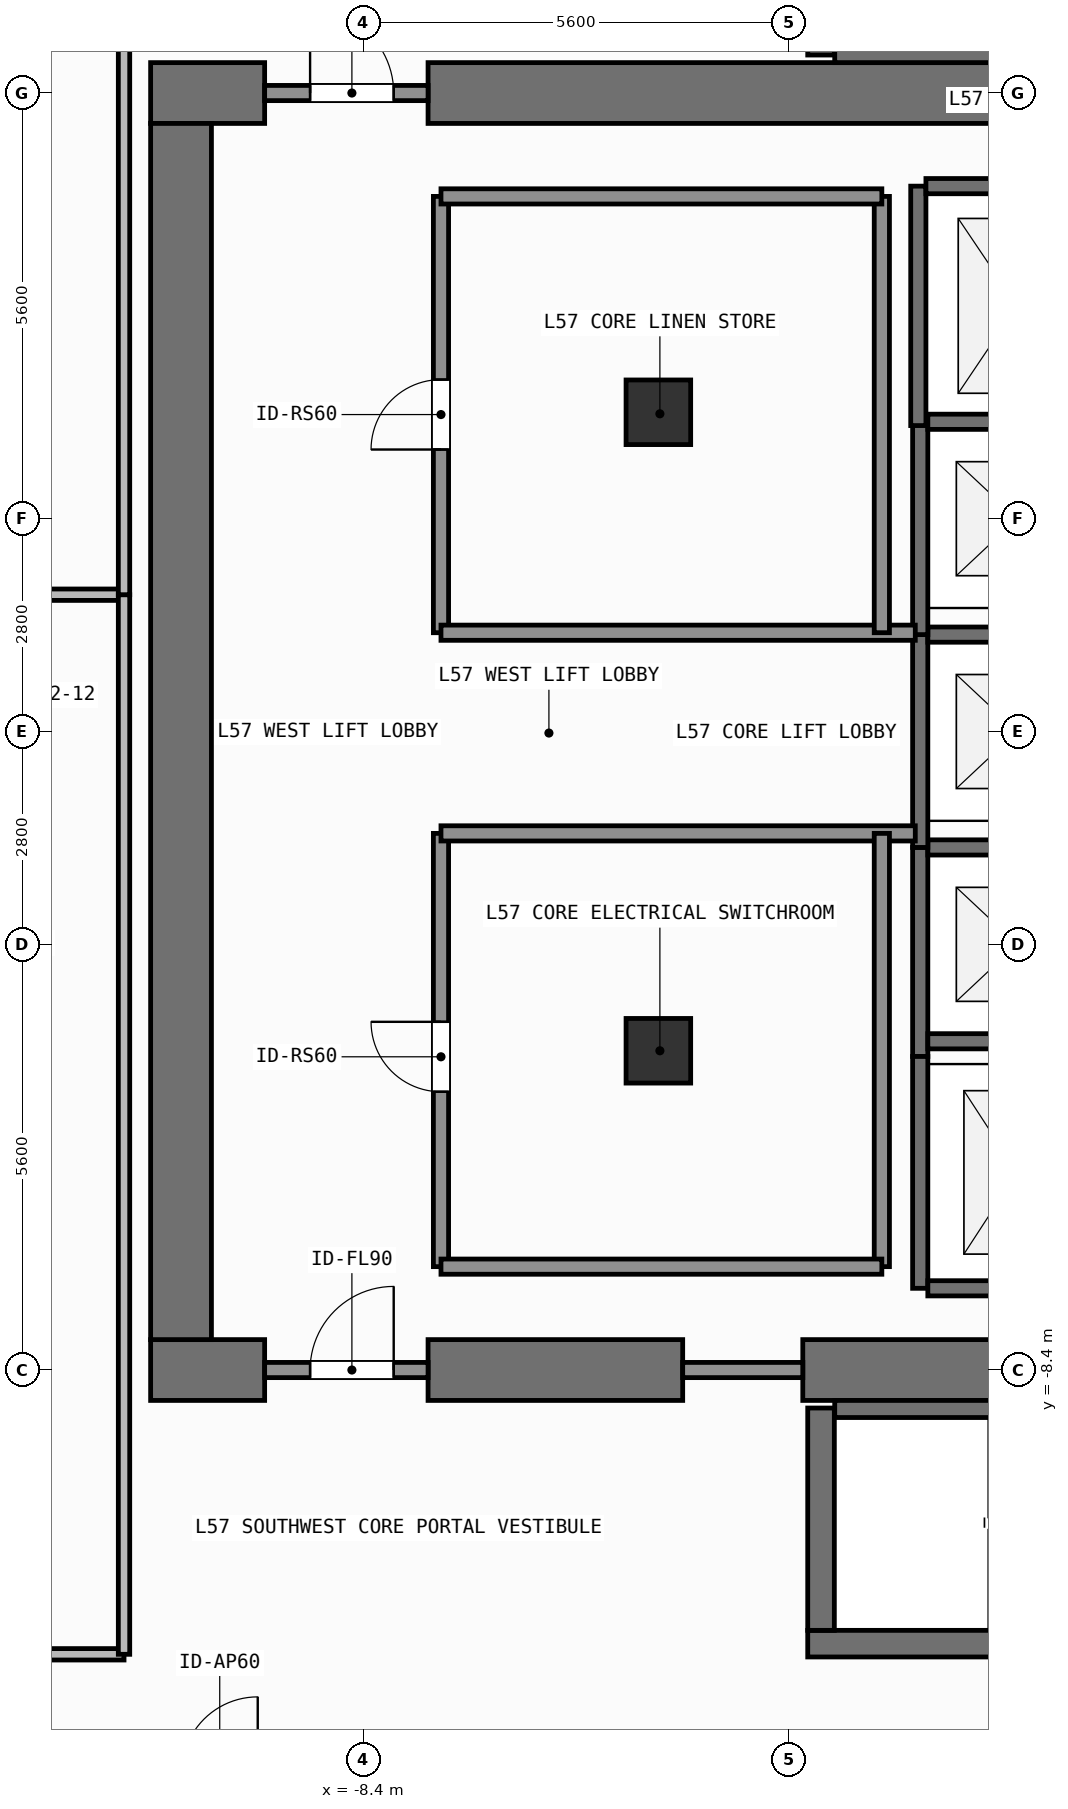
"""IFC4 building model, lengths in metres.
Left out: names, types, materials, properties, quantities, classifications, styles, units other than length and angle.
Written with IfcOpenShell. Run it as: python <this file> out.ifc"""

import sys

from ifc_helpers import new_model, si_unit, direction, frame, frame_2d, origin, origin_2d, place, context, subcontext, project, spatial, rectangle, extrude, element, fill, save


model = new_model("IFC4")
c1 = context("Model", 3, precision=1e-05, world=origin(), true_north=direction((0.0, 1.0)))
c2 = subcontext(c1, "Body", "Model", "MODEL_VIEW")
j1 = project(units=[si_unit("LENGTHUNIT", "METRE"), si_unit("PLANEANGLEUNIT", "RADIAN")], contexts=[c1])
p1 = place(None, origin())
s1 = spatial("IfcSite", under=j1, at=p1, CompositionType="ELEMENT")
p2 = place(p1, origin())
s2 = spatial("IfcBuilding", under=s1, at=p2, CompositionType="ELEMENT")
p3 = place(p2, frame((0.0, 0.0, 231.3)))
s3 = spatial("IfcBuildingStorey", under=s2, at=p3, CompositionType="ELEMENT", Elevation=231.3)
p4 = place(p3, frame((-11.2, -8.4, 0.0), z_axis=(0.0, 0.0, 1.0), x_axis=(1.0, 0.0, 0.0)))
e1 = element("IfcWall", 1, at=p4, inside=s3, PredefinedType="SHEAR", context=c2, shape_type="SweptSolid", body=[
    extrude(rectangle(XDim=1.5, YDim=0.8, at=frame_2d((0.75, 0.0))), origin(), (0.0, 0.0, 1.0), 3.9),
])
p5 = place(p3, frame((-7.55, -8.4, 0.0), z_axis=(0.0, 0.0, 1.0), x_axis=(1.0, 0.0, 0.0)))
e2 = element("IfcWall", 2, at=p5, inside=s3, PredefinedType="SHEAR", context=c2, shape_type="SweptSolid", body=[
    extrude(rectangle(XDim=3.35, YDim=0.8, at=frame_2d((1.675, 0.0))), origin(), (0.0, 0.0, 1.0), 3.9),
])
p6 = place(p3, frame((-2.62, -8.4, 0.0), z_axis=(0.0, 0.0, 1.0), x_axis=(1.0, 0.0, 0.0)))
e3 = element("IfcWall", 3, at=p6, inside=s3, PredefinedType="SHEAR", context=c2, shape_type="SweptSolid", body=[
    extrude(rectangle(XDim=7.27, YDim=0.8, at=frame_2d((3.635, 0.0))), origin(), (0.0, 0.0, 1.0), 3.9),
])
p7 = place(p3, frame((-11.2, 8.4, 0.0), z_axis=(0.0, 0.0, 1.0), x_axis=(1.0, 0.0, 0.0)))
e4 = element("IfcWall", 4, at=p7, inside=s3, PredefinedType="SHEAR", context=c2, shape_type="SweptSolid", body=[
    extrude(rectangle(XDim=1.5, YDim=0.8, at=frame_2d((0.75, 0.0))), origin(), (0.0, 0.0, 1.0), 3.9),
])
p8 = place(p3, frame((-7.55, 8.4, 0.0), z_axis=(0.0, 0.0, 1.0), x_axis=(1.0, 0.0, 0.0)))
e5 = element("IfcWall", 5, at=p8, inside=s3, PredefinedType="SHEAR", context=c2, shape_type="SweptSolid", body=[
    extrude(rectangle(XDim=16.35, YDim=0.8, at=frame_2d((8.175, 0.0))), origin(), (0.0, 0.0, 1.0), 3.9),
])
p9 = place(p3, frame((-10.8, -8.0, 0.0), z_axis=(0.0, 0.0, 1.0), x_axis=(0.0, 1.0, 0.0)))
e6 = element("IfcWall", 6, at=p9, inside=s3, PredefinedType="SHEAR", context=c2, shape_type="SweptSolid", body=[
    extrude(rectangle(XDim=16.0, YDim=0.8, at=frame_2d((8.0, 0.0))), origin(), (0.0, 0.0, 1.0), 3.9),
])
p10 = place(p3, frame((-2.555, -12.0, 0.0), z_axis=(0.0, 0.0, 1.0), x_axis=(1.0, 0.0, 0.0)))
e7 = element("IfcWall", 7, at=p10, inside=s3, PredefinedType="SHEAR", context=c2, shape_type="SweptSolid", body=[
    extrude(rectangle(XDim=7.31, YDim=0.35, at=frame_2d((3.655, 0.0))), origin(), (0.0, 0.0, 1.0), 3.9),
])
p11 = place(p3, frame((-2.2, -8.913, 0.0), z_axis=(0.0, 0.0, 1.0), x_axis=(1.0, 0.0, 0.0)))
e8 = element("IfcWall", 8, at=p11, inside=s3, PredefinedType="SHEAR", context=c2, shape_type="SweptSolid", body=[
    extrude(rectangle(XDim=6.6, YDim=0.225, at=frame_2d((3.3, 0.0))), origin(), (0.0, 0.0, 1.0), 3.9),
])
p12 = place(p3, frame((-2.38, -11.825, 0.0), z_axis=(0.0, 0.0, 1.0), x_axis=(0.0, 1.0, 0.0)))
e9 = element("IfcWall", 9, at=p12, inside=s3, PredefinedType="SHEAR", context=c2, shape_type="SweptSolid", body=[
    extrude(rectangle(XDim=2.925, YDim=0.35, at=frame_2d((1.462, 0.0))), origin(), (0.0, 0.0, 1.0), 3.9),
])
p13 = place(p3, frame((-2.2, 8.913, 0.0), z_axis=(0.0, 0.0, 1.0), x_axis=(1.0, 0.0, 0.0)))
e10 = element("IfcWall", 10, at=p13, inside=s3, PredefinedType="SHEAR", context=c2, shape_type="SweptSolid", body=[
    extrude(rectangle(XDim=6.6, YDim=0.225, at=frame_2d((3.3, 0.0))), origin(), (0.0, 0.0, 1.0), 3.9),
])
p14 = place(p3, frame((-2.38, 8.9, 0.0), z_axis=(0.0, 0.0, 1.0), x_axis=(0.0, 1.0, 0.0)))
e11 = element("IfcWall", 11, at=p14, inside=s3, PredefinedType="SHEAR", context=c2, shape_type="SweptSolid", body=[
    extrude(rectangle(XDim=2.925, YDim=0.35, at=frame_2d((1.462, 0.0))), origin(), (0.0, 0.0, 1.0), 3.9),
])
for number, where, z_axis, x_axis in (
    (12, (-4.52, -4.2, 0.0), (0.0, 0.0, 1.0), (1.0, 0.0, 0.0)),
    (13, (-4.52, 4.2, 0.0), (0.0, 0.0, 1.0), (1.0, 0.0, 0.0)),
):
    element("IfcColumn", number, at=place(p3, frame(where, z_axis=z_axis, x_axis=x_axis)), inside=s3, PredefinedType="COLUMN", context=c2, shape_type="SweptSolid", body=[
        extrude(rectangle(XDim=0.85, YDim=0.85, at=origin_2d()), origin(), (0.0, 0.0, 1.0), 3.9),
    ])
p15 = place(p3, frame((-1.075, -4.275, 0.0), z_axis=(0.0, 0.0, 1.0), x_axis=(0.0, 1.0, 0.0)))
e14 = element("IfcWall", 14, at=p15, inside=s3, PredefinedType="SHEAR", context=c2, shape_type="SweptSolid", body=[
    extrude(rectangle(XDim=2.75, YDim=0.2, at=frame_2d((1.375, 0.0))), origin(), (0.0, 0.0, 1.0), 3.6),
])
for number, where, z_axis, x_axis in (
    (15, (-0.975, -4.075, 0.0), (0.0, 0.0, 1.0), (1.0, 0.0, 0.0)),
    (16, (-0.975, -1.525, 0.0), (0.0, 0.0, 1.0), (1.0, 0.0, 0.0)),
):
    element("IfcWall", number, at=place(p3, frame(where, z_axis=z_axis, x_axis=x_axis)), inside=s3, PredefinedType="SHEAR", context=c2, shape_type="SweptSolid", body=[
        extrude(rectangle(XDim=2.35, YDim=0.2, at=frame_2d((1.175, 0.0))), origin(), (0.0, 0.0, 1.0), 3.6),
    ])
p16 = place(p3, frame((-1.075, -1.525, 0.0), z_axis=(0.0, 0.0, 1.0), x_axis=(0.0, 1.0, 0.0)))
e17 = element("IfcWall", 17, at=p16, inside=s3, PredefinedType="SHEAR", context=c2, shape_type="SweptSolid", body=[
    extrude(rectangle(XDim=2.8, YDim=0.2, at=frame_2d((1.4, 0.0))), origin(), (0.0, 0.0, 1.0), 3.6),
])
p17 = place(p3, frame((-0.975, 1.275, 0.0), z_axis=(0.0, 0.0, 1.0), x_axis=(1.0, 0.0, 0.0)))
e18 = element("IfcWall", 18, at=p17, inside=s3, PredefinedType="SHEAR", context=c2, shape_type="SweptSolid", body=[
    extrude(rectangle(XDim=2.35, YDim=0.2, at=frame_2d((1.175, 0.0))), origin(), (0.0, 0.0, 1.0), 3.6),
])
p18 = place(p3, frame((-1.075, 1.275, 0.0), z_axis=(0.0, 0.0, 1.0), x_axis=(0.0, 1.0, 0.0)))
e19 = element("IfcWall", 19, at=p18, inside=s3, PredefinedType="SHEAR", context=c2, shape_type="SweptSolid", body=[
    extrude(rectangle(XDim=2.8, YDim=0.2, at=frame_2d((1.4, 0.0))), origin(), (0.0, 0.0, 1.0), 3.6),
])
p19 = place(p3, frame((-0.975, 4.075, 0.0), z_axis=(0.0, 0.0, 1.0), x_axis=(1.0, 0.0, 0.0)))
e20 = element("IfcWall", 20, at=p19, inside=s3, PredefinedType="SHEAR", context=c2, shape_type="SweptSolid", body=[
    extrude(rectangle(XDim=2.35, YDim=0.2, at=frame_2d((1.175, 0.0))), origin(), (0.0, 0.0, 1.0), 3.6),
])
p20 = place(p3, frame((-1.1, 4.025, 0.0), z_axis=(0.0, 0.0, 1.0), x_axis=(0.0, 1.0, 0.0)))
e21 = element("IfcWall", 21, at=p20, inside=s3, PredefinedType="SHEAR", context=c2, shape_type="SweptSolid", body=[
    extrude(rectangle(XDim=3.15, YDim=0.2, at=frame_2d((1.575, 0.0))), origin(), (0.0, 0.0, 1.0), 3.6),
])
p21 = place(p3, frame((-1.0, 7.175, 0.0), z_axis=(0.0, 0.0, 1.0), x_axis=(1.0, 0.0, 0.0)))
e22 = element("IfcWall", 22, at=p21, inside=s3, PredefinedType="SHEAR", context=c2, shape_type="SweptSolid", body=[
    extrude(rectangle(XDim=2.4, YDim=0.2, at=frame_2d((1.2, 0.0))), origin(), (0.0, 0.0, 1.0), 3.6),
])
p22 = place(p3, frame((-1.075, -7.325, 0.0), z_axis=(0.0, 0.0, 1.0), x_axis=(0.0, 1.0, 0.0)))
e23 = element("IfcWall", 23, at=p22, inside=s3, PredefinedType="SHEAR", context=c2, shape_type="SweptSolid", body=[
    extrude(rectangle(XDim=3.05, YDim=0.2, at=frame_2d((1.525, 0.0))), origin(), (0.0, 0.0, 1.0), 3.6),
])
p23 = place(p3, frame((-0.975, -7.325, 0.0), z_axis=(0.0, 0.0, 1.0), x_axis=(1.0, 0.0, 0.0)))
e24 = element("IfcWall", 24, at=p23, inside=s3, PredefinedType="SHEAR", context=c2, shape_type="SweptSolid", body=[
    extrude(rectangle(XDim=2.35, YDim=0.2, at=frame_2d((1.175, 0.0))), origin(), (0.0, 0.0, 1.0), 3.6),
])
p24 = place(p3, frame((-9.7, -8.4, 0.0), z_axis=(0.0, 0.0, 1.0), x_axis=(1.0, 0.0, 0.0)))
e25 = element("IfcWall", 25, at=p24, inside=s3, PredefinedType="SOLIDWALL", context=c2, shape_type="SweptSolid", body=[
    extrude(rectangle(XDim=2.15, YDim=0.2, at=frame_2d((1.075, 0.0))), origin(), (0.0, 0.0, 1.0), 2.74),
])
p25 = place(p24, frame((0.598, 0.0, 0.0)))
e26 = element("IfcOpeningElement", 26, at=p25, cuts=e25, PredefinedType="OPENING", context=c2, shape_type="SweptSolid", body=[
    extrude(rectangle(XDim=1.1, YDim=2.15, at=frame_2d((0.55, 1.075))), frame((0.0, 0.11, 0.0), z_axis=(0.0, -1.0, 0.0), x_axis=(1.0, 0.0, 0.0)), (0.0, 0.0, 1.0), 0.22),
])
p26 = place(p3, frame((-9.7, 8.4, 0.0), z_axis=(0.0, 0.0, 1.0), x_axis=(1.0, 0.0, 0.0)))
e27 = element("IfcWall", 27, at=p26, inside=s3, PredefinedType="SOLIDWALL", context=c2, shape_type="SweptSolid", body=[
    extrude(rectangle(XDim=2.15, YDim=0.2, at=frame_2d((1.075, 0.0))), origin(), (0.0, 0.0, 1.0), 2.74),
])
p27 = place(p26, frame((0.598, 0.0, 0.0)))
e28 = element("IfcOpeningElement", 28, at=p27, cuts=e27, PredefinedType="OPENING", context=c2, shape_type="SweptSolid", body=[
    extrude(rectangle(XDim=1.1, YDim=2.15, at=frame_2d((0.55, 1.075))), frame((0.0, 0.11, 0.0), z_axis=(0.0, -1.0, 0.0), x_axis=(1.0, 0.0, 0.0)), (0.0, 0.0, 1.0), 0.22),
])
p28 = place(p3, frame((-7.38, -7.04, 0.0), z_axis=(0.0, 0.0, 1.0), x_axis=(0.0, 1.0, 0.0)))
e29 = element("IfcWall", 29, at=p28, inside=s3, PredefinedType="SOLIDWALL", context=c2, shape_type="SweptSolid", body=[
    extrude(rectangle(XDim=5.7, YDim=0.2, at=frame_2d((2.85, 0.0))), origin(), (0.0, 0.0, 1.0), 3.6),
])
p29 = place(p28, frame((2.301, 0.0, 0.0)))
e30 = element("IfcOpeningElement", 30, at=p29, cuts=e29, PredefinedType="OPENING", context=c2, shape_type="SweptSolid", body=[
    extrude(rectangle(XDim=0.92, YDim=2.1, at=frame_2d((0.46, 1.05))), frame((0.0, 0.11, 0.0), z_axis=(0.0, -1.0, 0.0), x_axis=(1.0, 0.0, 0.0)), (0.0, 0.0, 1.0), 0.22),
])
p30 = place(p3, frame((-7.38, 1.3, 0.0), z_axis=(0.0, 0.0, 1.0), x_axis=(0.0, 1.0, 0.0)))
e31 = element("IfcWall", 31, at=p30, inside=s3, PredefinedType="SOLIDWALL", context=c2, shape_type="SweptSolid", body=[
    extrude(rectangle(XDim=5.74, YDim=0.2, at=frame_2d((2.87, 0.0))), origin(), (0.0, 0.0, 1.0), 3.6),
])
p31 = place(p30, frame((2.41, 0.0, 0.0)))
e32 = element("IfcOpeningElement", 32, at=p31, cuts=e31, PredefinedType="OPENING", context=c2, shape_type="SweptSolid", body=[
    extrude(rectangle(XDim=0.92, YDim=2.1, at=frame_2d((0.46, 1.05))), frame((0.0, 0.11, 0.0), z_axis=(0.0, -1.0, 0.0), x_axis=(1.0, 0.0, 0.0)), (0.0, 0.0, 1.0), 0.22),
])
p32 = place(p3, frame((-18.33, -12.14, 0.0), z_axis=(0.0, 0.0, 1.0), x_axis=(1.0, 0.0, 0.0)))
e33 = element("IfcWall", 33, at=p32, inside=s3, PredefinedType="PARTITIONING", context=c2, shape_type="SweptSolid", body=[
    extrude(rectangle(XDim=6.78, YDim=0.15, at=frame_2d((3.39, 0.0))), origin(), (0.0, 0.0, 1.0), 3.6),
])
p33 = place(p32, frame((2.85, 0.0, 0.0)))
e34 = element("IfcOpeningElement", 34, at=p33, cuts=e33, PredefinedType="OPENING", context=c2, shape_type="SweptSolid", body=[
    extrude(rectangle(XDim=0.9, YDim=2.1, at=frame_2d((0.45, 1.05))), frame((0.0, 0.085, 0.0), z_axis=(0.0, -1.0, 0.0), x_axis=(1.0, 0.0, 0.0)), (0.0, 0.0, 1.0), 0.17),
])
p34 = place(p3, frame((-4.2, -8.4, 0.0), z_axis=(0.0, 0.0, 1.0), x_axis=(1.0, 0.0, 0.0)))
e35 = element("IfcWall", 35, at=p34, inside=s3, PredefinedType="SOLIDWALL", context=c2, shape_type="SweptSolid", body=[
    extrude(rectangle(XDim=1.58, YDim=0.2, at=frame_2d((0.79, 0.0))), origin(), (0.0, 0.0, 1.0), 2.74),
])
for number, where, z_axis, x_axis in (
    (36, (-7.38, -1.34, 0.0), (0.0, 0.0, 1.0), (1.0, 0.0, 0.0)),
    (37, (-7.38, 1.3, 0.0), (0.0, 0.0, 1.0), (1.0, 0.0, 0.0)),
):
    element("IfcWall", number, at=place(p3, frame(where, z_axis=z_axis, x_axis=x_axis)), inside=s3, PredefinedType="SOLIDWALL", context=c2, shape_type="SweptSolid", body=[
        extrude(rectangle(XDim=6.24, YDim=0.2, at=frame_2d((3.12, 0.0))), origin(), (0.0, 0.0, 1.0), 3.6),
    ])
p35 = place(p3, frame((-1.58, -7.04, 0.0), z_axis=(0.0, 0.0, 1.0), x_axis=(0.0, 1.0, 0.0)))
e38 = element("IfcWall", 38, at=p35, inside=s3, PredefinedType="SOLIDWALL", context=c2, shape_type="SweptSolid", body=[
    extrude(rectangle(XDim=5.7, YDim=0.2, at=frame_2d((2.85, 0.0))), origin(), (0.0, 0.0, 1.0), 3.6),
])
p36 = place(p3, frame((-7.38, -7.04, 0.0), z_axis=(0.0, 0.0, 1.0), x_axis=(1.0, 0.0, 0.0)))
e39 = element("IfcWall", 39, at=p36, inside=s3, PredefinedType="SOLIDWALL", context=c2, shape_type="SweptSolid", body=[
    extrude(rectangle(XDim=5.8, YDim=0.2, at=frame_2d((2.9, 0.0))), origin(), (0.0, 0.0, 1.0), 3.6),
])
p37 = place(p3, frame((-1.58, 1.3, 0.0), z_axis=(0.0, 0.0, 1.0), x_axis=(0.0, 1.0, 0.0)))
e40 = element("IfcWall", 40, at=p37, inside=s3, PredefinedType="SOLIDWALL", context=c2, shape_type="SweptSolid", body=[
    extrude(rectangle(XDim=5.74, YDim=0.2, at=frame_2d((2.87, 0.0))), origin(), (0.0, 0.0, 1.0), 3.6),
])
p38 = place(p3, frame((-7.38, 7.04, 0.0), z_axis=(0.0, 0.0, 1.0), x_axis=(1.0, 0.0, 0.0)))
e41 = element("IfcWall", 41, at=p38, inside=s3, PredefinedType="SOLIDWALL", context=c2, shape_type="SweptSolid", body=[
    extrude(rectangle(XDim=5.8, YDim=0.2, at=frame_2d((2.9, 0.0))), origin(), (0.0, 0.0, 1.0), 3.6),
])
p39 = place(p3, frame((-18.33, 1.8, 0.0), z_axis=(0.0, 0.0, 1.0), x_axis=(1.0, 0.0, 0.0)))
e42 = element("IfcWall", 42, at=p39, inside=s3, PredefinedType="PARTITIONING", context=c2, shape_type="SweptSolid", body=[
    extrude(rectangle(XDim=6.78, YDim=0.15, at=frame_2d((3.39, 0.0))), origin(), (0.0, 0.0, 1.0), 3.6),
])
p40 = place(p3, frame((-11.55, -12.14, 0.0), z_axis=(0.0, 0.0, 1.0), x_axis=(0.0, 1.0, 0.0)))
e43 = element("IfcWall", 43, at=p40, inside=s3, PredefinedType="PARTITIONING", context=c2, shape_type="SweptSolid", body=[
    extrude(rectangle(XDim=13.94, YDim=0.15, at=frame_2d((6.97, 0.0))), origin(), (0.0, 0.0, 1.0), 3.6),
])
p41 = place(p3, frame((-11.55, 1.8, 0.0), z_axis=(0.0, 0.0, 1.0), x_axis=(0.0, 1.0, 0.0)))
e44 = element("IfcWall", 44, at=p41, inside=s3, PredefinedType="PARTITIONING", context=c2, shape_type="SweptSolid", body=[
    extrude(rectangle(XDim=10.34, YDim=0.15, at=frame_2d((5.17, 0.0))), origin(), (0.0, 0.0, 1.0), 3.6),
])
p42 = place(p25, origin())
e45 = element("IfcDoor", 45, at=p42, inside=s3, OperationType="SINGLE_SWING_RIGHT", PredefinedType="DOOR", context=c2, shape_type="SweptSolid", body=[
    extrude(rectangle(XDim=1.1, YDim=2.15, at=frame_2d((0.55, 1.075))), frame((0.0, 0.025, 0.0), z_axis=(0.0, -1.0, 0.0), x_axis=(1.0, 0.0, 0.0)), (0.0, 0.0, 1.0), 0.05),
])
fill(e26, e45)
p43 = place(p27, origin())
e46 = element("IfcDoor", 46, at=p43, inside=s3, OperationType="SINGLE_SWING_LEFT", PredefinedType="DOOR", context=c2, shape_type="SweptSolid", body=[
    extrude(rectangle(XDim=1.1, YDim=2.15, at=frame_2d((0.55, 1.075))), frame((0.0, 0.025, 0.0), z_axis=(0.0, -1.0, 0.0), x_axis=(1.0, 0.0, 0.0)), (0.0, 0.0, 1.0), 0.05),
])
fill(e28, e46)
p44 = place(p29, origin())
e47 = element("IfcDoor", 47, at=p44, inside=s3, OperationType="SINGLE_SWING_RIGHT", PredefinedType="DOOR", context=c2, shape_type="SweptSolid", body=[
    extrude(rectangle(XDim=0.92, YDim=2.1, at=frame_2d((0.46, 1.05))), frame((0.0, 0.025, 0.0), z_axis=(0.0, -1.0, 0.0), x_axis=(1.0, 0.0, 0.0)), (0.0, 0.0, 1.0), 0.05),
])
fill(e30, e47)
p45 = place(p31, origin())
e48 = element("IfcDoor", 48, at=p45, inside=s3, OperationType="SINGLE_SWING_LEFT", PredefinedType="DOOR", context=c2, shape_type="SweptSolid", body=[
    extrude(rectangle(XDim=0.92, YDim=2.1, at=frame_2d((0.46, 1.05))), frame((0.0, 0.025, 0.0), z_axis=(0.0, -1.0, 0.0), x_axis=(1.0, 0.0, 0.0)), (0.0, 0.0, 1.0), 0.05),
])
fill(e32, e48)
save(model, sys.argv[1])
